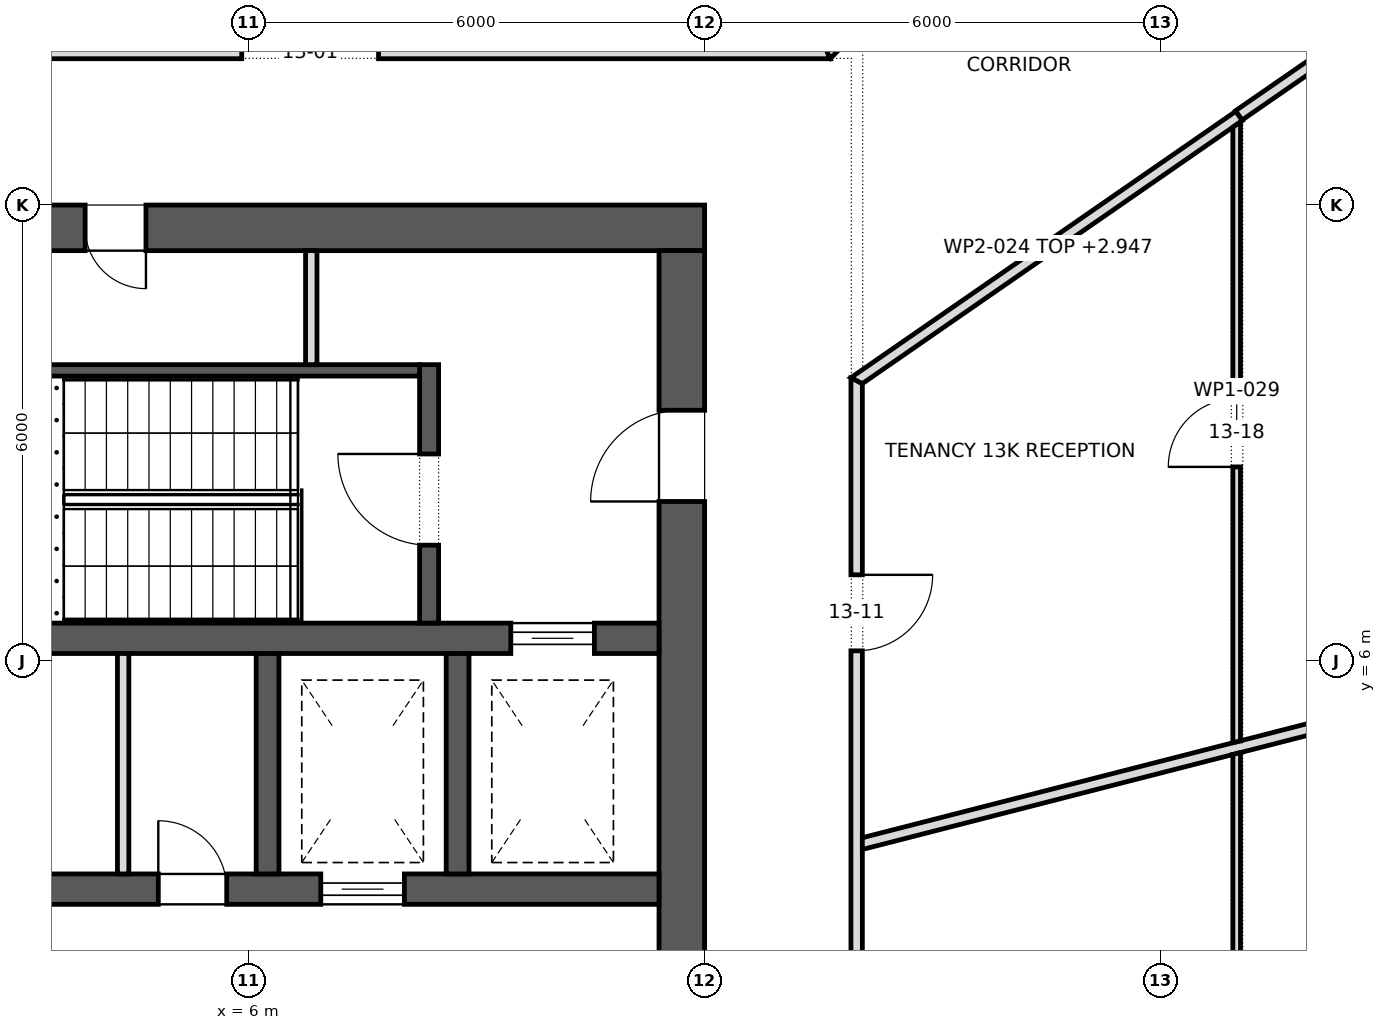
"""IFC4 building model, lengths in metres.
Left out: names, types, materials, properties, quantities, classifications, styles, units other than length and angle.
Written with IfcOpenShell. Run it as: python <this file> out.ifc"""

import sys

from ifc_helpers import new_model, si_unit, direction, frame, frame_2d, origin, place, context, subcontext, project, spatial, polyline, rectangle, outline, extrude, element, fill, save


model = new_model("IFC4")
c1 = context("Model", 3, precision=1e-05, world=origin(), true_north=direction((0.0, 1.0)))
c2 = subcontext(c1, "Body", "Model", "MODEL_VIEW")
j1 = project(units=[si_unit("LENGTHUNIT", "METRE"), si_unit("PLANEANGLEUNIT", "RADIAN")], contexts=[c1])
p1 = place(None, origin())
s1 = spatial("IfcSite", under=j1, at=p1, CompositionType="ELEMENT")
p2 = place(p1, origin())
s2 = spatial("IfcBuilding", under=s1, at=p2, CompositionType="ELEMENT")
p3 = place(p2, frame((0.0, 0.0, 190.9)))
s3 = spatial("IfcBuildingStorey", under=s2, at=p3, CompositionType="ELEMENT", Elevation=190.9)
p4 = place(p3, frame((-12.0, 11.7, 0.0), z_axis=(0.0, 0.0, 1.0), x_axis=(1.0, 0.0, 0.0)))
e1 = element("IfcWall", 1, at=p4, inside=s3, PredefinedType="SHEAR", context=c2, shape_type="SweptSolid", body=[
    extrude(rectangle(XDim=24.0, YDim=0.6, at=frame_2d((12.0, 0.0))), origin(), (0.0, 0.0, 1.0), 4.0),
])
p5 = place(p4, frame((9.975, 0.0, 0.0)))
e2 = element("IfcOpeningElement", 2, at=p5, cuts=e1, PredefinedType="OPENING", context=c2, shape_type="SweptSolid", body=[
    extrude(rectangle(XDim=0.9, YDim=2.1, at=frame_2d((0.45, 1.05))), frame((0.0, 0.312, 0.0), z_axis=(0.0, -1.0, 0.0), x_axis=(1.0, 0.0, 0.0)), (0.0, 0.0, 1.0), 0.624),
])
p6 = place(p4, frame((3.6, 0.0, 0.0)))
e3 = element("IfcOpeningElement", 3, at=p6, cuts=e1, PredefinedType="OPENING", context=c2, shape_type="SweptSolid", body=[
    extrude(rectangle(XDim=0.8, YDim=2.1, at=frame_2d((0.4, 1.05))), frame((0.0, 0.312, 0.0), z_axis=(0.0, -1.0, 0.0), x_axis=(1.0, 0.0, 0.0)), (0.0, 0.0, 1.0), 0.624),
])
p7 = place(p4, frame((6.2, 0.0, 0.0)))
e4 = element("IfcOpeningElement", 4, at=p7, cuts=e1, PredefinedType="OPENING", context=c2, shape_type="SweptSolid", body=[
    extrude(rectangle(XDim=0.8, YDim=2.1, at=frame_2d((0.4, 1.05))), frame((0.0, 0.312, 0.0), z_axis=(0.0, -1.0, 0.0), x_axis=(1.0, 0.0, 0.0)), (0.0, 0.0, 1.0), 0.624),
])
p8 = place(p4, frame((15.85, 0.0, 0.0)))
e5 = element("IfcOpeningElement", 5, at=p8, cuts=e1, PredefinedType="OPENING", context=c2, shape_type="SweptSolid", body=[
    extrude(rectangle(XDim=0.8, YDim=2.1, at=frame_2d((0.4, 1.05))), frame((0.0, 0.312, 0.0), z_axis=(0.0, -1.0, 0.0), x_axis=(1.0, 0.0, 0.0)), (0.0, 0.0, 1.0), 0.624),
])
p9 = place(p3, frame((11.7, -11.4, 0.0), z_axis=(0.0, 0.0, 1.0), x_axis=(0.0, 1.0, 0.0)))
e6 = element("IfcWall", 6, at=p9, inside=s3, PredefinedType="SHEAR", context=c2, shape_type="SweptSolid", body=[
    extrude(rectangle(XDim=22.8, YDim=0.6, at=frame_2d((11.4, 0.0))), origin(), (0.0, 0.0, 1.0), 4.0),
])
p10 = place(p9, frame((10.2, 0.0, 0.0)))
e7 = element("IfcOpeningElement", 7, at=p10, cuts=e6, PredefinedType="OPENING", context=c2, shape_type="SweptSolid", body=[
    extrude(rectangle(XDim=2.4, YDim=2.1, at=frame_2d((1.2, 1.05))), frame((0.0, 0.312, 0.0), z_axis=(0.0, -1.0, 0.0), x_axis=(1.0, 0.0, 0.0)), (0.0, 0.0, 1.0), 0.624),
])
p11 = place(p9, frame((19.5, 0.0, 0.0)))
e8 = element("IfcOpeningElement", 8, at=p11, cuts=e6, PredefinedType="OPENING", context=c2, shape_type="SweptSolid", body=[
    extrude(rectangle(XDim=1.2, YDim=2.1, at=frame_2d((0.6, 1.05))), frame((0.0, 0.312, 0.0), z_axis=(0.0, -1.0, 0.0), x_axis=(1.0, 0.0, 0.0)), (0.0, 0.0, 1.0), 0.624),
])
p12 = place(p9, frame((2.1, 0.0, 0.0)))
e9 = element("IfcOpeningElement", 9, at=p12, cuts=e6, PredefinedType="OPENING", context=c2, shape_type="SweptSolid", body=[
    extrude(rectangle(XDim=1.2, YDim=2.1, at=frame_2d((0.6, 1.05))), frame((0.0, 0.312, 0.0), z_axis=(0.0, -1.0, 0.0), x_axis=(1.0, 0.0, 0.0)), (0.0, 0.0, 1.0), 0.624),
])
p13 = place(p3, frame((-11.4, 3.0, 0.0), z_axis=(0.0, 0.0, 1.0), x_axis=(1.0, 0.0, 0.0)))
e10 = element("IfcWall", 10, at=p13, inside=s3, PredefinedType="SHEAR", context=c2, shape_type="SweptSolid", body=[
    extrude(rectangle(XDim=22.8, YDim=0.4, at=frame_2d((11.4, 0.0))), origin(), (0.0, 0.0, 1.0), 4.0),
])
p14 = place(p13, frame((0.85, 0.0, 0.0)))
e11 = element("IfcOpeningElement", 11, at=p14, cuts=e10, PredefinedType="OPENING", context=c2, shape_type="SweptSolid", body=[
    extrude(rectangle(XDim=1.1, YDim=2.1, at=frame_2d((0.55, 1.05))), frame((0.0, 0.212, 0.0), z_axis=(0.0, -1.0, 0.0), x_axis=(1.0, 0.0, 0.0)), (0.0, 0.0, 1.0), 0.424),
])
p15 = place(p13, frame((3.35, 0.0, 0.0)))
e12 = element("IfcOpeningElement", 12, at=p15, cuts=e10, PredefinedType="OPENING", context=c2, shape_type="SweptSolid", body=[
    extrude(rectangle(XDim=1.1, YDim=2.1, at=frame_2d((0.55, 1.05))), frame((0.0, 0.212, 0.0), z_axis=(0.0, -1.0, 0.0), x_axis=(1.0, 0.0, 0.0)), (0.0, 0.0, 1.0), 0.424),
])
p16 = place(p13, frame((5.85, 0.0, 0.0)))
e13 = element("IfcOpeningElement", 13, at=p16, cuts=e10, PredefinedType="OPENING", context=c2, shape_type="SweptSolid", body=[
    extrude(rectangle(XDim=1.1, YDim=2.1, at=frame_2d((0.55, 1.05))), frame((0.0, 0.212, 0.0), z_axis=(0.0, -1.0, 0.0), x_axis=(1.0, 0.0, 0.0)), (0.0, 0.0, 1.0), 0.424),
])
p17 = place(p13, frame((8.35, 0.0, 0.0)))
e14 = element("IfcOpeningElement", 14, at=p17, cuts=e10, PredefinedType="OPENING", context=c2, shape_type="SweptSolid", body=[
    extrude(rectangle(XDim=1.1, YDim=2.1, at=frame_2d((0.55, 1.05))), frame((0.0, 0.212, 0.0), z_axis=(0.0, -1.0, 0.0), x_axis=(1.0, 0.0, 0.0)), (0.0, 0.0, 1.0), 0.424),
])
p18 = place(p13, frame((18.35, 0.0, 0.0)))
e15 = element("IfcOpeningElement", 15, at=p18, cuts=e10, PredefinedType="OPENING", context=c2, shape_type="SweptSolid", body=[
    extrude(rectangle(XDim=1.1, YDim=2.1, at=frame_2d((0.55, 1.05))), frame((0.0, 0.212, 0.0), z_axis=(0.0, -1.0, 0.0), x_axis=(1.0, 0.0, 0.0)), (0.0, 0.0, 1.0), 0.424),
])
p19 = place(p13, frame((13.788, 0.0, 0.0)))
e16 = element("IfcOpeningElement", 16, at=p19, cuts=e10, PredefinedType="OPENING", context=c2, shape_type="SweptSolid", body=[
    extrude(rectangle(XDim=0.9, YDim=2.1, at=frame_2d((0.45, 1.05))), frame((0.0, 0.212, 0.0), z_axis=(0.0, -1.0, 0.0), x_axis=(1.0, 0.0, 0.0)), (0.0, 0.0, 1.0), 0.424),
])
p20 = place(p13, frame((16.212, 0.0, 0.0)))
e17 = element("IfcOpeningElement", 17, at=p20, cuts=e10, PredefinedType="OPENING", context=c2, shape_type="SweptSolid", body=[
    extrude(rectangle(XDim=0.9, YDim=2.1, at=frame_2d((0.45, 1.05))), frame((0.0, 0.212, 0.0), z_axis=(0.0, -1.0, 0.0), x_axis=(1.0, 0.0, 0.0)), (0.0, 0.0, 1.0), 0.424),
])
p21 = place(p3, frame((-11.4, 6.3, 0.0), z_axis=(0.0, 0.0, 1.0), x_axis=(1.0, 0.0, 0.0)))
e18 = element("IfcWall", 18, at=p21, inside=s3, PredefinedType="SHEAR", context=c2, shape_type="SweptSolid", body=[
    extrude(rectangle(XDim=22.8, YDim=0.4, at=frame_2d((11.4, 0.0))), origin(), (0.0, 0.0, 1.0), 4.0),
])
p22 = place(p21, frame((20.85, 0.0, 0.0)))
e19 = element("IfcOpeningElement", 19, at=p22, cuts=e18, PredefinedType="OPENING", context=c2, shape_type="SweptSolid", body=[
    extrude(rectangle(XDim=1.1, YDim=2.1, at=frame_2d((0.55, 1.05))), frame((0.0, 0.212, 0.0), z_axis=(0.0, -1.0, 0.0), x_axis=(1.0, 0.0, 0.0)), (0.0, 0.0, 1.0), 0.424),
])
for number, where, z_axis, x_axis in (
    (20, (6.25, 3.2, 0.0), (0.0, 0.0, 1.0), (0.0, 1.0, 0.0)),
    (21, (8.75, 3.2, 0.0), (0.0, 0.0, 1.0), (0.0, 1.0, 0.0)),
):
    element("IfcWall", number, at=place(p3, frame(where, z_axis=z_axis, x_axis=x_axis)), inside=s3, PredefinedType="SHEAR", context=c2, shape_type="SweptSolid", body=[
        extrude(rectangle(XDim=2.9, YDim=0.3, at=frame_2d((1.45, 0.0))), origin(), (0.0, 0.0, 1.0), 4.0),
    ])
p23 = place(p3, frame((8.375, 6.5, 0.0), z_axis=(0.0, 0.0, 1.0), x_axis=(0.0, 1.0, 0.0)))
e22 = element("IfcWall", 22, at=p23, inside=s3, PredefinedType="SHEAR", context=c2, shape_type="SweptSolid", body=[
    extrude(rectangle(XDim=3.4, YDim=0.25, at=frame_2d((1.7, 0.0))), origin(), (0.0, 0.0, 1.0), 3.7),
])
p24 = place(p23, frame((1.025, 0.0, 0.0)))
e23 = element("IfcOpeningElement", 23, at=p24, cuts=e22, PredefinedType="OPENING", context=c2, shape_type="SweptSolid", body=[
    extrude(rectangle(XDim=1.2, YDim=2.1, at=frame_2d((0.6, 1.05))), frame((0.0, 0.137, 0.0), z_axis=(0.0, -1.0, 0.0), x_axis=(1.0, 0.0, 0.0)), (0.0, 0.0, 1.0), 0.274),
])
p25 = place(p3, frame((0.25, 9.825, 0.0), z_axis=(0.0, 0.0, 1.0), x_axis=(1.0, 0.0, 0.0)))
e24 = element("IfcWall", 24, at=p25, inside=s3, PredefinedType="SHEAR", context=c2, shape_type="SweptSolid", body=[
    extrude(rectangle(XDim=8.0, YDim=0.15, at=frame_2d((4.0, 0.0))), origin(), (0.0, 0.0, 1.0), 3.7),
])
p26 = place(p3, frame((6.825, 9.9, 0.0), z_axis=(0.0, 0.0, 1.0), x_axis=(0.0, 1.0, 0.0)))
e25 = element("IfcWall", 25, at=p26, inside=s3, PredefinedType="PARTITIONING", context=c2, shape_type="SweptSolid", body=[
    extrude(rectangle(XDim=1.5, YDim=0.15, at=frame_2d((0.75, 0.0))), origin(), (0.0, 0.0, 1.0), 3.7),
])
p27 = place(p3, frame((4.35, 3.2, 0.0), z_axis=(0.0, 0.0, 1.0), x_axis=(0.0, 1.0, 0.0)))
e26 = element("IfcWall", 26, at=p27, inside=s3, PredefinedType="PARTITIONING", context=c2, shape_type="SweptSolid", body=[
    extrude(rectangle(XDim=2.9, YDim=0.15, at=frame_2d((1.45, 0.0))), origin(), (0.0, 0.0, 1.0), 3.7),
])
p28 = place(p3, frame((-13.652, 14.0, 0.0), z_axis=(0.0, 0.0, 1.0), x_axis=(1.0, 0.0, 0.0)))
e27 = element("IfcWall", 27, at=p28, inside=s3, PredefinedType="PARTITIONING", context=c2, shape_type="SweptSolid", body=[
    extrude(outline(polyline([(27.303, -0.075), (27.303, -0.075), (27.24, 0.075), (25.299, 0.075), (23.358, 0.075), (21.416, 0.075), (19.475, 0.075), (17.534, 0.075), (15.593, 0.075), (13.652, 0.075), (11.71, 0.075), (9.769, 0.075), (7.828, 0.075), (5.887, 0.075), (3.946, 0.075), (2.004, 0.075), (0.063, 0.075), (0.0, -0.075), (0.0, -0.075), (1.95, -0.075), (3.9, -0.075), (5.851, -0.075), (7.801, -0.075), (9.751, -0.075), (11.701, -0.075), (13.652, -0.075), (15.602, -0.075), (17.552, -0.075), (19.502, -0.075), (21.453, -0.075), (23.403, -0.075), (25.353, -0.075), (27.303, -0.075)])), origin(), (0.0, 0.0, 1.0), 3.7),
])
p29 = place(p28, frame((19.562, 0.0, 0.0)))
e28 = element("IfcOpeningElement", 28, at=p29, cuts=e27, PredefinedType="OPENING", context=c2, shape_type="SweptSolid", body=[
    extrude(rectangle(XDim=1.8, YDim=2.1, at=frame_2d((0.9, 1.05))), frame((0.0, 0.087, 0.0), z_axis=(0.0, -1.0, 0.0), x_axis=(1.0, 0.0, 0.0)), (0.0, 0.0, 1.0), 0.174),
])
p30 = place(p28, frame((5.942, 0.0, 0.0)))
e29 = element("IfcOpeningElement", 29, at=p30, cuts=e27, PredefinedType="OPENING", context=c2, shape_type="SweptSolid", body=[
    extrude(rectangle(XDim=1.8, YDim=2.1, at=frame_2d((0.9, 1.05))), frame((0.0, 0.087, 0.0), z_axis=(0.0, -1.0, 0.0), x_axis=(1.0, 0.0, 0.0)), (0.0, 0.0, 1.0), 0.174),
])
p31 = place(p3, frame((13.598, 13.977, 0.0), z_axis=(0.0, 0.0, 1.0), x_axis=(0.696864554069, 0.717202756048, 0.0)))
e30 = element("IfcWall", 30, at=p31, inside=s3, PredefinedType="PARTITIONING", context=c2, shape_type="SweptSolid", body=[
    extrude(outline(polyline([(7.599, -0.075), (7.599, -0.074), (7.594, -0.003), (7.573, 0.075), (5.696, 0.075), (3.818, 0.075), (1.941, 0.075), (0.063, 0.075), (0.032, 0.0), (0.0, -0.075), (1.9, -0.075), (3.799, -0.075), (5.699, -0.075), (7.599, -0.075)])), origin(), (0.0, 0.0, 1.0), 3.7),
])
p32 = place(p3, frame((14.0, -9.729, 0.0), z_axis=(0.0, 0.0, 1.0), x_axis=(0.0, 1.0, 0.0)))
e31 = element("IfcWall", 31, at=p32, inside=s3, PredefinedType="PARTITIONING", context=c2, shape_type="SweptSolid", body=[
    extrude(outline(polyline([(0.079, -0.075), (2.009, -0.075), (3.939, -0.075), (5.869, -0.075), (7.799, -0.075), (9.729, -0.075), (11.659, -0.075), (13.59, -0.075), (15.52, -0.075), (17.45, -0.075), (19.38, -0.075), (19.458, 0.075), (19.458, 0.075), (17.513, 0.075), (15.567, 0.075), (13.621, 0.075), (11.675, 0.075), (9.729, 0.075), (7.783, 0.075), (5.838, 0.075), (3.892, 0.075), (1.946, 0.075), (0.0, 0.075), (0.0, 0.075), (0.079, -0.075)])), origin(), (0.0, 0.0, 1.0), 3.7),
])
p33 = place(p32, frame((2.594, 0.0, 0.0)))
e32 = element("IfcOpeningElement", 32, at=p33, cuts=e31, PredefinedType="OPENING", context=c2, shape_type="SweptSolid", body=[
    extrude(rectangle(XDim=1.0, YDim=2.1, at=frame_2d((0.5, 1.05))), frame((0.0, 0.087, 0.0), z_axis=(0.0, -1.0, 0.0), x_axis=(1.0, 0.0, 0.0)), (0.0, 0.0, 1.0), 0.174),
])
p34 = place(p32, frame((9.229, 0.0, 0.0)))
e33 = element("IfcOpeningElement", 33, at=p34, cuts=e31, PredefinedType="OPENING", context=c2, shape_type="SweptSolid", body=[
    extrude(rectangle(XDim=1.0, YDim=2.1, at=frame_2d((0.5, 1.05))), frame((0.0, 0.087, 0.0), z_axis=(0.0, -1.0, 0.0), x_axis=(1.0, 0.0, 0.0)), (0.0, 0.0, 1.0), 0.174),
])
p35 = place(p32, frame((15.864, 0.0, 0.0)))
e34 = element("IfcOpeningElement", 34, at=p35, cuts=e31, PredefinedType="OPENING", context=c2, shape_type="SweptSolid", body=[
    extrude(rectangle(XDim=1.0, YDim=2.1, at=frame_2d((0.5, 1.05))), frame((0.0, 0.087, 0.0), z_axis=(0.0, -1.0, 0.0), x_axis=(1.0, 0.0, 0.0)), (0.0, 0.0, 1.0), 0.174),
])
p36 = place(p3, frame((14.057, 3.594, 0.0), z_axis=(0.0, 0.0, 1.0), x_axis=(0.96870063855, 0.248231893342, 0.0)))
e35 = element("IfcWall", 35, at=p36, inside=s3, PredefinedType="PARTITIONING", context=c2, shape_type="SweptSolid", body=[
    extrude(outline(polyline([(0.0, -0.075), (1.677, -0.075), (3.355, -0.075), (5.032, -0.075), (5.033, -0.073), (5.038, -0.075), (7.011, -0.075), (8.985, -0.075), (10.958, -0.075), (12.931, -0.075), (14.904, -0.075), (14.904, 0.008), (14.89, 0.075), (12.947, 0.075), (11.004, 0.075), (9.061, 0.075), (7.117, 0.075), (5.174, 0.075), (5.174, 0.073), (5.168, 0.075), (3.458, 0.075), (1.748, 0.075), (0.038, 0.075), (0.0, -0.074), (0.0, -0.075)])), origin(), (0.0, 0.0, 1.0), 2.71),
])
p37 = place(p3, frame((13.968, 9.667, 0.0), z_axis=(0.0, 0.0, 1.0), x_axis=(0.822290630684, 0.569067762827, 0.0)))
e36 = element("IfcWall", 36, at=p37, inside=s3, PredefinedType="PARTITIONING", context=c2, shape_type="SweptSolid", body=[
    extrude(outline(polyline([(6.16, 0.075), (4.62, 0.075), (3.08, 0.075), (1.54, 0.075), (0.0, 0.075), (0.079, -0.075), (1.599, -0.075), (3.119, -0.075), (4.64, -0.075), (6.16, -0.075), (6.16, 0.075)])), origin(), (0.0, 0.0, 1.0), 2.947),
])
p38 = place(p3, frame((19.028, 13.179, 0.0), z_axis=(0.0, 0.0, 1.0), x_axis=(0.822732902653, 0.568428158074, 0.0)))
e37 = element("IfcWall", 37, at=p38, inside=s3, PredefinedType="PARTITIONING", context=c2, shape_type="SweptSolid", body=[
    extrude(outline(polyline([(4.857, -0.075), (4.857, -0.068), (4.852, 0.002), (4.832, 0.075), (3.221, 0.075), (1.611, 0.075), (0.0, 0.075), (0.0, -0.04), (0.0, -0.075), (1.619, -0.075), (3.238, -0.075), (4.857, -0.075)])), origin(), (0.0, 0.0, 1.0), 3.7),
])
p39 = place(p3, frame((19.0, 4.796, 0.0), z_axis=(0.0, 0.0, 1.0), x_axis=(0.0, -1.0, 0.0)))
e38 = element("IfcWall", 38, at=p39, inside=s3, PredefinedType="PARTITIONING", context=c2, shape_type="SweptSolid", body=[
    extrude(outline(polyline([(0.025, -0.05), (1.934, -0.05), (3.842, -0.05), (5.75, -0.05), (7.659, -0.05), (9.567, -0.05), (9.593, 0.049), (9.593, 0.05), (7.674, 0.05), (5.756, 0.05), (3.837, 0.05), (1.918, 0.05), (0.0, 0.05), (0.0, 0.049), (0.025, -0.05)])), origin(), (0.0, 0.0, 1.0), 3.7),
])
p40 = place(p39, frame((4.346, 0.0, 0.0)))
e39 = element("IfcOpeningElement", 39, at=p40, cuts=e38, PredefinedType="OPENING", context=c2, shape_type="SweptSolid", body=[
    extrude(rectangle(XDim=0.9, YDim=2.1, at=frame_2d((0.45, 1.05))), frame((0.0, 0.062, 0.0), z_axis=(0.0, -1.0, 0.0), x_axis=(1.0, 0.0, 0.0)), (0.0, 0.0, 1.0), 0.124),
])
p41 = place(p3, frame((19.0, 13.093, 0.0), z_axis=(0.0, 0.0, 1.0), x_axis=(0.0, -1.0, 0.0)))
e40 = element("IfcWall", 40, at=p41, inside=s3, PredefinedType="PARTITIONING", context=c2, shape_type="SweptSolid", body=[
    extrude(outline(polyline([(8.167, -0.05), (8.167, -0.049), (8.142, 0.05), (6.513, 0.05), (4.885, 0.05), (3.257, 0.05), (1.628, 0.05), (0.0, 0.05), (0.0, 0.05), (0.069, -0.05), (1.688, -0.05), (3.308, -0.05), (4.928, -0.05), (6.547, -0.05), (8.167, -0.05)])), origin(), (0.0, 0.0, 1.0), 3.7),
])
p42 = place(p41, frame((3.638, 0.0, 0.0)))
e41 = element("IfcOpeningElement", 41, at=p42, cuts=e40, PredefinedType="OPENING", context=c2, shape_type="SweptSolid", body=[
    extrude(rectangle(XDim=0.9, YDim=2.1, at=frame_2d((0.45, 1.05))), frame((0.0, 0.062, 0.0), z_axis=(0.0, -1.0, 0.0), x_axis=(1.0, 0.0, 0.0)), (0.0, 0.0, 1.0), 0.124),
])
p43 = place(p22, origin())
e42 = element("IfcDoor", 42, at=p43, inside=s3, OperationType="SLIDING_TO_LEFT", PredefinedType="DOOR", context=c2, shape_type="SweptSolid", body=[
    extrude(rectangle(XDim=1.1, YDim=2.1, at=frame_2d((0.55, 1.05))), frame((0.0, 0.025, 0.0), z_axis=(0.0, -1.0, 0.0), x_axis=(1.0, 0.0, 0.0)), (0.0, 0.0, 1.0), 0.05),
])
fill(e19, e42)
p44 = place(p18, origin())
e43 = element("IfcDoor", 43, at=p44, inside=s3, OperationType="SLIDING_TO_LEFT", PredefinedType="DOOR", context=c2, shape_type="SweptSolid", body=[
    extrude(rectangle(XDim=1.1, YDim=2.1, at=frame_2d((0.55, 1.05))), frame((0.0, 0.025, 0.0), z_axis=(0.0, -1.0, 0.0), x_axis=(1.0, 0.0, 0.0)), (0.0, 0.0, 1.0), 0.05),
])
fill(e15, e43)
p45 = place(p24, origin())
e44 = element("IfcDoor", 44, at=p45, inside=s3, OperationType="SINGLE_SWING_LEFT", PredefinedType="DOOR", context=c2, shape_type="SweptSolid", body=[
    extrude(rectangle(XDim=1.2, YDim=2.1, at=frame_2d((0.6, 1.05))), frame((0.0, 0.025, 0.0), z_axis=(0.0, -1.0, 0.0), x_axis=(1.0, 0.0, 0.0)), (0.0, 0.0, 1.0), 0.05),
])
fill(e23, e44)
p46 = place(p11, origin())
e45 = element("IfcDoor", 45, at=p46, inside=s3, OperationType="SINGLE_SWING_RIGHT", PredefinedType="DOOR", context=c2, shape_type="SweptSolid", body=[
    extrude(rectangle(XDim=1.2, YDim=2.1, at=frame_2d((0.6, 1.05))), frame((0.0, 0.025, 0.0), z_axis=(0.0, -1.0, 0.0), x_axis=(1.0, 0.0, 0.0)), (0.0, 0.0, 1.0), 0.05),
])
fill(e8, e45)
p47 = place(p8, frame((0.8, 0.0, 0.0), z_axis=(0.0, 0.0, 1.0), x_axis=(-1.0, 0.0, 0.0)))
e46 = element("IfcDoor", 46, at=p47, inside=s3, OperationType="SINGLE_SWING_RIGHT", PredefinedType="DOOR", context=c2, shape_type="SweptSolid", body=[
    extrude(rectangle(XDim=0.8, YDim=2.1, at=frame_2d((0.4, 1.05))), frame((0.0, 0.025, 0.0), z_axis=(0.0, -1.0, 0.0), x_axis=(1.0, 0.0, 0.0)), (0.0, 0.0, 1.0), 0.05),
])
fill(e5, e46)
p48 = place(p20, origin())
e47 = element("IfcDoor", 47, at=p48, inside=s3, OperationType="SINGLE_SWING_RIGHT", PredefinedType="DOOR", context=c2, shape_type="SweptSolid", body=[
    extrude(rectangle(XDim=0.9, YDim=2.1, at=frame_2d((0.45, 1.05))), frame((0.0, 0.025, 0.0), z_axis=(0.0, -1.0, 0.0), x_axis=(1.0, 0.0, 0.0)), (0.0, 0.0, 1.0), 0.05),
])
fill(e17, e47)
p49 = place(p29, origin())
e48 = element("IfcDoor", 48, at=p49, inside=s3, OperationType="DOUBLE_DOOR_SINGLE_SWING", PredefinedType="DOOR", context=c2, shape_type="SweptSolid", body=[
    extrude(rectangle(XDim=1.8, YDim=2.1, at=frame_2d((0.9, 1.05))), frame((0.0, 0.025, 0.0), z_axis=(0.0, -1.0, 0.0), x_axis=(1.0, 0.0, 0.0)), (0.0, 0.0, 1.0), 0.05),
])
fill(e28, e48)
p50 = place(p35, frame((1.0, 0.0, 0.0), z_axis=(0.0, 0.0, 1.0), x_axis=(-1.0, 0.0, 0.0)))
e49 = element("IfcDoor", 49, at=p50, inside=s3, OperationType="SINGLE_SWING_RIGHT", PredefinedType="DOOR", context=c2, shape_type="SweptSolid", body=[
    extrude(rectangle(XDim=1.0, YDim=2.1, at=frame_2d((0.5, 1.05))), frame((0.0, 0.025, 0.0), z_axis=(0.0, -1.0, 0.0), x_axis=(1.0, 0.0, 0.0)), (0.0, 0.0, 1.0), 0.05),
])
fill(e34, e49)
p51 = place(p42, frame((0.9, 0.0, 0.0), z_axis=(0.0, 0.0, 1.0), x_axis=(-1.0, 0.0, 0.0)))
e50 = element("IfcDoor", 50, at=p51, inside=s3, OperationType="SINGLE_SWING_RIGHT", PredefinedType="DOOR", context=c2, shape_type="SweptSolid", body=[
    extrude(rectangle(XDim=0.9, YDim=2.1, at=frame_2d((0.45, 1.05))), frame((0.0, 0.025, 0.0), z_axis=(0.0, -1.0, 0.0), x_axis=(1.0, 0.0, 0.0)), (0.0, 0.0, 1.0), 0.05),
])
fill(e41, e50)
save(model, sys.argv[1])
